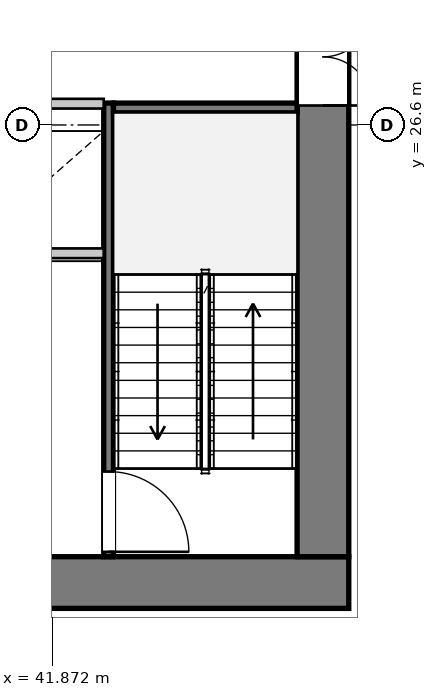
"""IFC4 building model, lengths in metres.
Left out: names, types, materials, properties, quantities, classifications, styles, units other than length and angle.
Written with IfcOpenShell. Run it as: python <this file> out.ifc"""

import sys

from ifc_helpers import new_model, si_unit, direction, frame, frame_2d, origin, place, context, subcontext, project, spatial, rectangle, extrude, source, transform, mapped, element, fill, save


model = new_model("IFC4")
c1 = context("Model", 3, precision=1e-05, world=origin(), true_north=direction((0.0, 1.0)))
c2 = subcontext(c1, "Body", "Model", "MODEL_VIEW")
j1 = project(units=[si_unit("LENGTHUNIT", "METRE"), si_unit("PLANEANGLEUNIT", "RADIAN")], contexts=[c1])
p1 = place(None, origin())
s1 = spatial("IfcSite", under=j1, at=p1, CompositionType="ELEMENT")
p2 = place(p1, origin())
s2 = spatial("IfcBuilding", under=s1, at=p2, CompositionType="ELEMENT")
p3 = place(p2, frame((0.0, 0.0, 71.9)))
s3 = spatial("IfcBuildingStorey", under=s2, at=p3, CompositionType="ELEMENT", Elevation=71.9)
p4 = place(p3, frame((46.75, 19.075, 0.0), z_axis=(0.0, 0.0, 1.0), x_axis=(-1.0, 0.0, 0.0)))
e1 = element("IfcWall", 1, at=p4, inside=s3, PredefinedType="SHEAR", context=c2, shape_type="SweptSolid", body=[
    extrude(rectangle(XDim=17.5, YDim=0.85, at=frame_2d((8.75, 0.0))), origin(), (0.0, 0.0, 1.0), 3.75),
])
p5 = place(p4, frame((4.95, 0.0, 0.0)))
e2 = element("IfcOpeningElement", 2, at=p5, cuts=e1, PredefinedType="OPENING", context=c2, shape_type="SweptSolid", body=[
    extrude(rectangle(XDim=1.12, YDim=2.25, at=frame_2d((0.56, 1.125))), frame((0.0, 0.435, 0.0), z_axis=(0.0, -1.0, 0.0), x_axis=(1.0, 0.0, 0.0)), (0.0, 0.0, 1.0), 0.87),
])
p6 = place(p4, frame((11.45, 0.0, 0.0)))
e3 = element("IfcOpeningElement", 3, at=p6, cuts=e1, PredefinedType="OPENING", context=c2, shape_type="SweptSolid", body=[
    extrude(rectangle(XDim=1.12, YDim=2.25, at=frame_2d((0.56, 1.125))), frame((0.0, 0.435, 0.0), z_axis=(0.0, -1.0, 0.0), x_axis=(1.0, 0.0, 0.0)), (0.0, 0.0, 1.0), 0.87),
])
p7 = place(p3, frame((46.325, 33.7, 0.0), z_axis=(0.0, 0.0, 1.0), x_axis=(0.0, -1.0, 0.0)))
e4 = element("IfcWall", 4, at=p7, inside=s3, PredefinedType="SHEAR", context=c2, shape_type="SweptSolid", body=[
    extrude(rectangle(XDim=14.2, YDim=0.85, at=frame_2d((7.1, 0.0))), origin(), (0.0, 0.0, 1.0), 3.75),
])
p8 = place(p7, frame((5.18, 0.0, 0.0)))
e5 = element("IfcOpeningElement", 5, at=p8, cuts=e4, PredefinedType="OPENING", context=c2, shape_type="SweptSolid", body=[
    extrude(rectangle(XDim=1.6, YDim=2.2, at=frame_2d((0.8, 1.1))), frame((0.0, 0.435, 0.0), z_axis=(0.0, -1.0, 0.0), x_axis=(1.0, 0.0, 0.0)), (0.0, 0.0, 1.0), 0.87),
])
p9 = place(p3, frame((42.8, 26.96, 0.0), z_axis=(0.0, 0.0, 1.0), x_axis=(0.0, -1.0, 0.0)))
e6 = element("IfcWall", 6, at=p9, inside=s3, PredefinedType="PARTITIONING", context=c2, shape_type="SweptSolid", body=[
    extrude(rectangle(XDim=7.46, YDim=0.16, at=frame_2d((3.73, 0.0))), origin(), (0.0, 0.0, 1.0), 3.75),
])
p10 = place(p9, frame((6.06, 0.0, 0.0)))
e7 = element("IfcOpeningElement", 7, at=p10, cuts=e6, PredefinedType="OPENING", context=c2, shape_type="SweptSolid", body=[
    extrude(rectangle(XDim=1.32, YDim=2.2, at=frame_2d((0.66, 1.1))), frame((0.0, 0.09, 0.0), z_axis=(0.0, -1.0, 0.0), x_axis=(1.0, 0.0, 0.0)), (0.0, 0.0, 1.0), 0.18),
])
p11 = place(p3, frame((42.88, 26.88, 0.0), z_axis=(0.0, 0.0, 1.0), x_axis=(1.0, 0.0, 0.0)))
e8 = element("IfcWall", 8, at=p11, inside=s3, PredefinedType="PARTITIONING", context=c2, shape_type="SweptSolid", body=[
    extrude(rectangle(XDim=3.02, YDim=0.16, at=frame_2d((1.51, 0.0))), origin(), (0.0, 0.0, 1.0), 3.75),
])
p12 = place(p3, frame((33.28, 24.49, 0.0), z_axis=(0.0, 0.0, 1.0), x_axis=(1.0, 0.0, 0.0)))
e9 = element("IfcWall", 9, at=p12, inside=s3, PredefinedType="PARTITIONING", context=c2, shape_type="SweptSolid", body=[
    extrude(rectangle(XDim=9.44, YDim=0.16, at=frame_2d((4.72, 0.0))), origin(), (0.0, 0.0, 1.0), 3.75),
])
p13 = place(p12, frame((0.85, 0.0, 0.95)))
e10 = element("IfcOpeningElement", 10, at=p13, cuts=e9, PredefinedType="OPENING", context=c2, shape_type="SweptSolid", body=[
    extrude(rectangle(XDim=1.4, YDim=1.8, at=frame_2d((0.7, 0.9))), frame((0.0, 0.09, 0.0), z_axis=(0.0, -1.0, 0.0), x_axis=(1.0, 0.0, 0.0)), (0.0, 0.0, 1.0), 0.18),
])
p14 = place(p3, frame((33.28, 26.95, 0.0), z_axis=(0.0, 0.0, 1.0), x_axis=(1.0, 0.0, 0.0)))
e11 = element("IfcWall", 11, at=p14, inside=s3, PredefinedType="PARTITIONING", context=c2, shape_type="SweptSolid", body=[
    extrude(rectangle(XDim=9.44, YDim=0.16, at=frame_2d((4.72, 0.0))), origin(), (0.0, 0.0, 1.0), 3.75),
])
p15 = place(p14, frame((0.26, 0.0, 0.0)))
e12 = element("IfcOpeningElement", 12, at=p15, cuts=e11, PredefinedType="OPENING", context=c2, shape_type="SweptSolid", body=[
    extrude(rectangle(XDim=1.1, YDim=2.2, at=frame_2d((0.55, 1.1))), frame((0.0, 0.09, 0.0), z_axis=(0.0, -1.0, 0.0), x_axis=(1.0, 0.0, 0.0)), (0.0, 0.0, 1.0), 0.18),
])
p16 = place(p14, frame((2.01, 0.0, 0.0)))
e13 = element("IfcOpeningElement", 13, at=p16, cuts=e11, PredefinedType="OPENING", context=c2, shape_type="SweptSolid", body=[
    extrude(rectangle(XDim=1.1, YDim=2.2, at=frame_2d((0.55, 1.1))), frame((0.0, 0.09, 0.0), z_axis=(0.0, -1.0, 0.0), x_axis=(1.0, 0.0, 0.0)), (0.0, 0.0, 1.0), 0.18),
])
p17 = place(p14, frame((3.76, 0.0, 0.0)))
e14 = element("IfcOpeningElement", 14, at=p17, cuts=e11, PredefinedType="OPENING", context=c2, shape_type="SweptSolid", body=[
    extrude(rectangle(XDim=1.1, YDim=2.2, at=frame_2d((0.55, 1.1))), frame((0.0, 0.09, 0.0), z_axis=(0.0, -1.0, 0.0), x_axis=(1.0, 0.0, 0.0)), (0.0, 0.0, 1.0), 0.18),
])
p18 = place(p14, frame((5.51, 0.0, 0.0)))
e15 = element("IfcOpeningElement", 15, at=p18, cuts=e11, PredefinedType="OPENING", context=c2, shape_type="SweptSolid", body=[
    extrude(rectangle(XDim=1.1, YDim=2.2, at=frame_2d((0.55, 1.1))), frame((0.0, 0.09, 0.0), z_axis=(0.0, -1.0, 0.0), x_axis=(1.0, 0.0, 0.0)), (0.0, 0.0, 1.0), 0.18),
])
m1 = source(origin(), c2, "Body", "SweptSolid", [
    extrude(rectangle(XDim=1.6, YDim=2.2, at=frame_2d((0.8, 1.1))), frame((0.0, 0.025, 0.0), z_axis=(0.0, -1.0, 0.0), x_axis=(1.0, 0.0, 0.0)), (0.0, 0.0, 1.0), 0.05),
])
p19 = place(p8, origin())
e16 = element("IfcDoor", 16, at=p19, inside=s3, OperationType="DOUBLE_DOOR_SINGLE_SWING", PredefinedType="DOOR", context=c2, shape_type="MappedRepresentation", body=[
    mapped(m1, transform((0.0, 0.0, 0.0), x_axis=(1.0, 0.0, 0.0), y_axis=(0.0, 1.0, 0.0), z_axis=(0.0, 0.0, 1.0), scale=1.0)),
])
fill(e5, e16)
m2 = source(origin(), c2, "Body", "SweptSolid", [
    extrude(rectangle(XDim=1.32, YDim=2.2, at=frame_2d((0.66, 1.1))), frame((0.0, 0.025, 0.0), z_axis=(0.0, -1.0, 0.0), x_axis=(1.0, 0.0, 0.0)), (0.0, 0.0, 1.0), 0.05),
])
p20 = place(p10, origin())
e17 = element("IfcDoor", 17, at=p20, inside=s3, OperationType="SINGLE_SWING_RIGHT", PredefinedType="DOOR", context=c2, shape_type="MappedRepresentation", body=[
    mapped(m2, transform((0.0, 0.0, 0.0), x_axis=(1.0, 0.0, 0.0), y_axis=(0.0, 1.0, 0.0), z_axis=(0.0, 0.0, 1.0), scale=1.0)),
])
fill(e7, e17)
save(model, sys.argv[1])
